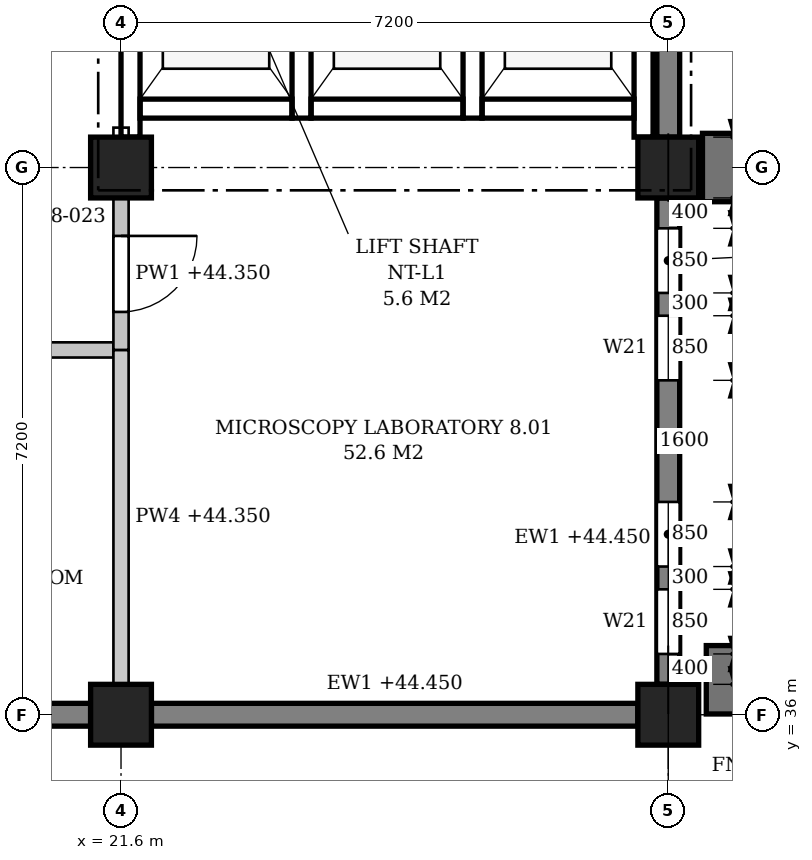
"""IFC4 building model, lengths in metres.
Left out: names, types, materials, properties, quantities, classifications, styles, units other than length and angle.
Written with IfcOpenShell. Run it as: python <this file> out.ifc"""

import sys

from ifc_helpers import new_model, si_unit, direction, frame, frame_2d, origin, origin_2d, place, context, subcontext, project, spatial, polyline, rectangle, outline, extrude, element, fill, save


model = new_model("IFC4")
c1 = context("Model", 3, precision=1e-05, world=origin(), true_north=direction((0.0, 1.0)))
c2 = subcontext(c1, "Body", "Model", "MODEL_VIEW")
j1 = project(units=[si_unit("LENGTHUNIT", "METRE"), si_unit("PLANEANGLEUNIT", "RADIAN")], contexts=[c1])
p1 = place(None, origin())
s1 = spatial("IfcSite", under=j1, at=p1, CompositionType="ELEMENT")
p2 = place(p1, origin())
s2 = spatial("IfcBuilding", under=s1, at=p2, CompositionType="ELEMENT")
p3 = place(p2, frame((0.0, 0.0, 40.8)))
s3 = spatial("IfcBuildingStorey", under=s2, at=p3, CompositionType="ELEMENT", Elevation=40.8)
for number, where, z_axis, x_axis in (
    (1, (21.6, 36.0, 0.0), (0.0, 0.0, 1.0), (1.0, 0.0, 0.0)),
    (2, (21.6, 43.2, 0.0), (0.0, 0.0, 1.0), (1.0, 0.0, 0.0)),
    (3, (28.8, 36.0, 0.0), (0.0, 0.0, 1.0), (1.0, 0.0, 0.0)),
    (4, (28.8, 43.2, 0.0), (0.0, 0.0, 1.0), (1.0, 0.0, 0.0)),
):
    element("IfcColumn", number, at=place(p3, frame(where, z_axis=z_axis, x_axis=x_axis)), inside=s3, PredefinedType="COLUMN", context=c2, shape_type="SweptSolid", body=[
        extrude(rectangle(XDim=0.8, YDim=0.8, at=origin_2d()), origin(), (0.0, 0.0, 1.0), 4.5),
    ])
p4 = place(p3, frame((28.8, 36.4, 0.0), z_axis=(0.0, 0.0, 1.0), x_axis=(0.0, 1.0, 0.0)))
e5 = element("IfcWall", 5, at=p4, inside=s3, PredefinedType="STANDARD", context=c2, shape_type="SweptSolid", body=[
    extrude(rectangle(XDim=6.4, YDim=0.3, at=frame_2d((3.2, 0.0))), origin(), (0.0, 0.0, 1.0), 3.65),
])
p5 = place(p4, frame((0.4, 0.0, 0.9)))
e6 = element("IfcOpeningElement", 6, at=p5, cuts=e5, PredefinedType="OPENING", context=c2, shape_type="SweptSolid", body=[
    extrude(outline(polyline([(0.0, 0.0), (0.85, 0.0), (0.85, 2.25), (0.425, 2.7), (0.0, 2.25), (0.0, 0.0)])), frame((0.0, 0.16, 0.0), z_axis=(0.0, -1.0, 0.0), x_axis=(1.0, 0.0, 0.0)), (0.0, 0.0, 1.0), 0.32),
])
p6 = place(p4, frame((1.55, 0.0, 0.9)))
e7 = element("IfcOpeningElement", 7, at=p6, cuts=e5, PredefinedType="OPENING", context=c2, shape_type="SweptSolid", body=[
    extrude(outline(polyline([(0.0, 0.0), (0.85, 0.0), (0.85, 2.25), (0.425, 2.7), (0.0, 2.25), (0.0, 0.0)])), frame((0.0, 0.16, 0.0), z_axis=(0.0, -1.0, 0.0), x_axis=(1.0, 0.0, 0.0)), (0.0, 0.0, 1.0), 0.32),
])
p7 = place(p4, frame((4.0, 0.0, 0.9)))
e8 = element("IfcOpeningElement", 8, at=p7, cuts=e5, PredefinedType="OPENING", context=c2, shape_type="SweptSolid", body=[
    extrude(outline(polyline([(0.0, 0.0), (0.85, 0.0), (0.85, 2.25), (0.425, 2.7), (0.0, 2.25), (0.0, 0.0)])), frame((0.0, 0.16, 0.0), z_axis=(0.0, -1.0, 0.0), x_axis=(1.0, 0.0, 0.0)), (0.0, 0.0, 1.0), 0.32),
])
p8 = place(p4, frame((5.15, 0.0, 0.9)))
e9 = element("IfcOpeningElement", 9, at=p8, cuts=e5, PredefinedType="OPENING", context=c2, shape_type="SweptSolid", body=[
    extrude(outline(polyline([(0.0, 0.0), (0.85, 0.0), (0.85, 2.25), (0.425, 2.7), (0.0, 2.25), (0.0, 0.0)])), frame((0.0, 0.16, 0.0), z_axis=(0.0, -1.0, 0.0), x_axis=(1.0, 0.0, 0.0)), (0.0, 0.0, 1.0), 0.32),
])
p9 = place(p3, frame((28.8, 43.6, 0.0), z_axis=(0.0, 0.0, 1.0), x_axis=(0.0, 1.0, 0.0)))
e10 = element("IfcWall", 10, at=p9, inside=s3, PredefinedType="STANDARD", context=c2, shape_type="SweptSolid", body=[
    extrude(rectangle(XDim=6.4, YDim=0.3, at=frame_2d((3.2, 0.0))), origin(), (0.0, 0.0, 1.0), 3.65),
])
p10 = place(p9, frame((4.0, 0.0, 0.9)))
e11 = element("IfcOpeningElement", 11, at=p10, cuts=e10, PredefinedType="OPENING", context=c2, shape_type="SweptSolid", body=[
    extrude(outline(polyline([(0.0, 0.0), (0.85, 0.0), (0.85, 2.25), (0.425, 2.7), (0.0, 2.25), (0.0, 0.0)])), frame((0.0, 0.16, 0.0), z_axis=(0.0, -1.0, 0.0), x_axis=(1.0, 0.0, 0.0)), (0.0, 0.0, 1.0), 0.32),
])
p11 = place(p9, frame((5.15, 0.0, 0.9)))
e12 = element("IfcOpeningElement", 12, at=p11, cuts=e10, PredefinedType="OPENING", context=c2, shape_type="SweptSolid", body=[
    extrude(outline(polyline([(0.0, 0.0), (0.85, 0.0), (0.85, 2.25), (0.425, 2.7), (0.0, 2.25), (0.0, 0.0)])), frame((0.0, 0.16, 0.0), z_axis=(0.0, -1.0, 0.0), x_axis=(1.0, 0.0, 0.0)), (0.0, 0.0, 1.0), 0.32),
])
for number, where, z_axis, x_axis in (
    (13, (14.8, 36.0, 0.0), (0.0, 0.0, 1.0), (1.0, 0.0, 0.0)),
    (14, (22.0, 36.0, 0.0), (0.0, 0.0, 1.0), (1.0, 0.0, 0.0)),
):
    element("IfcWall", number, at=place(p3, frame(where, z_axis=z_axis, x_axis=x_axis)), inside=s3, PredefinedType="STANDARD", context=c2, shape_type="SweptSolid", body=[
        extrude(rectangle(XDim=6.4, YDim=0.3, at=frame_2d((3.2, 0.0))), origin(), (0.0, 0.0, 1.0), 3.65),
    ])
p12 = place(p3, frame((29.3, 36.46, 0.0), z_axis=(0.0, 0.0, 1.0), x_axis=(1.0, 0.0, 0.0)))
e15 = element("IfcWall", 15, at=p12, inside=s3, PredefinedType="POLYGONAL", context=c2, shape_type="SweptSolid", body=[
    extrude(outline(polyline([(1.1, 0.0), (1.1, 12.075), (0.15, 13.5), (0.0, 13.5), (0.0, 0.0), (1.1, 0.0)])), frame((0.0, 0.45, 0.0), z_axis=(0.0, -1.0, 0.0), x_axis=(1.0, 0.0, 0.0)), (0.0, 0.0, 1.0), 0.9),
])
p13 = place(p3, frame((29.25, 43.2, -0.25), z_axis=(0.0, 0.0, 1.0), x_axis=(1.0, 0.0, 0.0)))
e16 = element("IfcWall", 16, at=p13, inside=s3, PredefinedType="POLYGONAL", context=c2, shape_type="SweptSolid", body=[
    extrude(outline(polyline([(1.1, 0.0), (1.1, 12.325), (0.15, 13.75), (0.0, 13.75), (0.0, 0.0), (1.1, 0.0)])), frame((0.0, 0.45, 0.0), z_axis=(0.0, -1.0, 0.0), x_axis=(1.0, 0.0, 0.0)), (0.0, 0.0, 1.0), 0.9),
])
p14 = place(p3, frame((21.725, 43.6, -0.25), z_axis=(0.0, 0.0, 1.0), x_axis=(0.0, 1.0, 0.0)))
e17 = element("IfcWall", 17, at=p14, inside=s3, PredefinedType="SHEAR", context=c2, shape_type="SweptSolid", body=[
    extrude(rectangle(XDim=3.55, YDim=0.25, at=frame_2d((1.775, 0.0))), origin(), (0.0, 0.0, 1.0), 3.8),
])
for number, where, z_axis, x_axis in (
    (18, (23.975, 43.85, -0.25), (0.0, 0.0, 1.0), (0.0, 1.0, 0.0)),
    (19, (26.225, 43.85, -0.25), (0.0, 0.0, 1.0), (0.0, 1.0, 0.0)),
):
    element("IfcWall", number, at=place(p3, frame(where, z_axis=z_axis, x_axis=x_axis)), inside=s3, PredefinedType="SHEAR", context=c2, shape_type="SweptSolid", body=[
        extrude(rectangle(XDim=3.3, YDim=0.25, at=frame_2d((1.65, 0.0))), origin(), (0.0, 0.0, 1.0), 4.5),
    ])
p15 = place(p3, frame((28.475, 43.6, -0.25), z_axis=(0.0, 0.0, 1.0), x_axis=(0.0, 1.0, 0.0)))
e20 = element("IfcWall", 20, at=p15, inside=s3, PredefinedType="SHEAR", context=c2, shape_type="SweptSolid", body=[
    extrude(rectangle(XDim=3.55, YDim=0.25, at=frame_2d((1.775, 0.0))), origin(), (0.0, 0.0, 1.0), 4.5),
])
for number, where, z_axis, x_axis in (
    (21, (21.85, 43.975, -0.25), (0.0, 0.0, 1.0), (1.0, 0.0, 0.0)),
    (22, (24.1, 43.975, -0.25), (0.0, 0.0, 1.0), (1.0, 0.0, 0.0)),
    (23, (26.35, 43.975, -0.25), (0.0, 0.0, 1.0), (1.0, 0.0, 0.0)),
):
    element("IfcWall", number, at=place(p3, frame(where, z_axis=z_axis, x_axis=x_axis)), inside=s3, PredefinedType="SHEAR", context=c2, shape_type="SweptSolid", body=[
        extrude(rectangle(XDim=2.0, YDim=0.25, at=frame_2d((1.0, 0.0))), origin(), (0.0, 0.0, 1.0), 4.5),
    ])
p16 = place(p3, frame((18.1, 40.8, 0.0), z_axis=(0.0, 0.0, 1.0), x_axis=(1.0, 0.0, 0.0)))
e24 = element("IfcWall", 24, at=p16, inside=s3, PredefinedType="PARTITIONING", context=c2, shape_type="SweptSolid", body=[
    extrude(outline(polyline([(0.0, 0.0), (3.4, 0.0), (3.4, 3.55), (3.275, 3.55), (3.275, 4.25), (0.0, 4.25), (0.0, 0.0)])), frame((0.0, 0.1, 0.0), z_axis=(0.0, -1.0, 0.0), x_axis=(1.0, 0.0, 0.0)), (0.0, 0.0, 1.0), 0.2),
])
p17 = place(p16, frame((1.2, 0.0, 0.0)))
e25 = element("IfcOpeningElement", 25, at=p17, cuts=e24, PredefinedType="OPENING", context=c2, shape_type="SweptSolid", body=[
    extrude(rectangle(XDim=1.0, YDim=2.1, at=frame_2d((0.5, 1.05))), frame((0.0, 0.11, 0.0), z_axis=(0.0, -1.0, 0.0), x_axis=(1.0, 0.0, 0.0)), (0.0, 0.0, 1.0), 0.22),
])
p18 = place(p3, frame((21.6, 36.4, 0.0), z_axis=(0.0, 0.0, 1.0), x_axis=(0.0, 1.0, 0.0)))
e26 = element("IfcWall", 26, at=p18, inside=s3, PredefinedType="PARTITIONING", context=c2, shape_type="SweptSolid", body=[
    extrude(rectangle(XDim=4.4, YDim=0.2, at=frame_2d((2.2, 0.0))), origin(), (0.0, 0.0, 1.0), 3.55),
])
p19 = place(p3, frame((21.6, 40.8, 0.0), z_axis=(0.0, 0.0, 1.0), x_axis=(0.0, 1.0, 0.0)))
e27 = element("IfcWall", 27, at=p19, inside=s3, PredefinedType="PARTITIONING", context=c2, shape_type="SweptSolid", body=[
    extrude(rectangle(XDim=2.0, YDim=0.2, at=frame_2d((1.0, 0.0))), origin(), (0.0, 0.0, 1.0), 3.55),
])
p20 = place(p19, frame((0.5, 0.0, 0.0)))
e28 = element("IfcOpeningElement", 28, at=p20, cuts=e27, PredefinedType="OPENING", context=c2, shape_type="SweptSolid", body=[
    extrude(rectangle(XDim=1.0, YDim=2.1, at=frame_2d((0.5, 1.05))), frame((0.0, 0.11, 0.0), z_axis=(0.0, -1.0, 0.0), x_axis=(1.0, 0.0, 0.0)), (0.0, 0.0, 1.0), 0.22),
])
p21 = place(p3, frame((21.6, 43.6, 0.0), z_axis=(0.0, 0.0, 1.0), x_axis=(0.0, 1.0, 0.0)))
e29 = element("IfcWall", 29, at=p21, inside=s3, PredefinedType="PARTITIONING", context=c2, shape_type="SweptSolid", body=[
    extrude(rectangle(XDim=0.125, YDim=0.2, at=frame_2d((0.062, 0.0))), origin(), (0.0, 0.0, 1.0), 3.55),
])
p22 = place(p5, origin())
e30 = element("IfcWindow", 30, at=p22, inside=s3, PartitioningType="SINGLE_PANEL", PredefinedType="WINDOW", context=c2, shape_type="SweptSolid", body=[
    extrude(outline(polyline([(0.0, 0.0), (0.85, 0.0), (0.85, 2.25), (0.425, 2.7), (0.0, 2.25), (0.0, 0.0)])), frame((0.0, 0.03, 0.0), z_axis=(0.0, -1.0, 0.0), x_axis=(1.0, 0.0, 0.0)), (0.0, 0.0, 1.0), 0.06),
])
fill(e6, e30)
p23 = place(p6, origin())
e31 = element("IfcWindow", 31, at=p23, inside=s3, PartitioningType="SINGLE_PANEL", PredefinedType="WINDOW", context=c2, shape_type="SweptSolid", body=[
    extrude(outline(polyline([(0.0, 0.0), (0.85, 0.0), (0.85, 2.25), (0.425, 2.7), (0.0, 2.25), (0.0, 0.0)])), frame((0.0, 0.03, 0.0), z_axis=(0.0, -1.0, 0.0), x_axis=(1.0, 0.0, 0.0)), (0.0, 0.0, 1.0), 0.06),
])
fill(e7, e31)
p24 = place(p7, origin())
e32 = element("IfcWindow", 32, at=p24, inside=s3, PartitioningType="SINGLE_PANEL", PredefinedType="WINDOW", context=c2, shape_type="SweptSolid", body=[
    extrude(outline(polyline([(0.0, 0.0), (0.85, 0.0), (0.85, 2.25), (0.425, 2.7), (0.0, 2.25), (0.0, 0.0)])), frame((0.0, 0.03, 0.0), z_axis=(0.0, -1.0, 0.0), x_axis=(1.0, 0.0, 0.0)), (0.0, 0.0, 1.0), 0.06),
])
fill(e8, e32)
p25 = place(p8, origin())
e33 = element("IfcWindow", 33, at=p25, inside=s3, PartitioningType="SINGLE_PANEL", PredefinedType="WINDOW", context=c2, shape_type="SweptSolid", body=[
    extrude(outline(polyline([(0.0, 0.0), (0.85, 0.0), (0.85, 2.25), (0.425, 2.7), (0.0, 2.25), (0.0, 0.0)])), frame((0.0, 0.03, 0.0), z_axis=(0.0, -1.0, 0.0), x_axis=(1.0, 0.0, 0.0)), (0.0, 0.0, 1.0), 0.06),
])
fill(e9, e33)
p26 = place(p20, frame((1.0, 0.0, 0.0), z_axis=(0.0, 0.0, 1.0), x_axis=(-1.0, 0.0, 0.0)))
e34 = element("IfcDoor", 34, at=p26, inside=s3, OperationType="SINGLE_SWING_LEFT", PredefinedType="DOOR", context=c2, shape_type="SweptSolid", body=[
    extrude(rectangle(XDim=1.0, YDim=2.1, at=frame_2d((0.5, 1.05))), frame((0.0, 0.025, 0.0), z_axis=(0.0, -1.0, 0.0), x_axis=(1.0, 0.0, 0.0)), (0.0, 0.0, 1.0), 0.05),
])
fill(e28, e34)
save(model, sys.argv[1])
